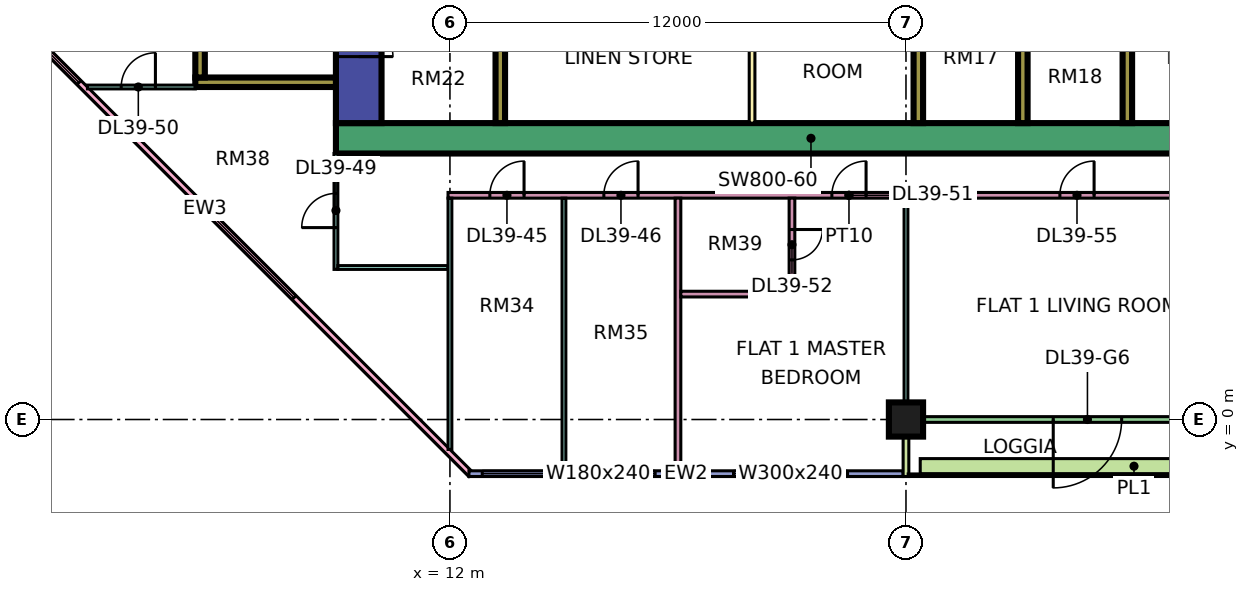
"""IFC4 building model, lengths in metres.
Left out: names, types, materials, properties, quantities, classifications, styles, units other than length and angle.
Written with IfcOpenShell. Run it as: python <this file> out.ifc"""

import sys

from ifc_helpers import new_model, si_unit, direction, frame, frame_2d, origin, origin_2d, place, context, subcontext, project, spatial, rectangle, extrude, element, fill, save


model = new_model("IFC4")
c1 = context("Model", 3, precision=1e-05, world=origin(), true_north=direction((0.0, 1.0)))
c2 = subcontext(c1, "Body", "Model", "MODEL_VIEW")
j1 = project(units=[si_unit("LENGTHUNIT", "METRE"), si_unit("PLANEANGLEUNIT", "RADIAN")], contexts=[c1])
p1 = place(None, origin())
s1 = spatial("IfcSite", under=j1, at=p1, CompositionType="ELEMENT")
p2 = place(p1, origin())
s2 = spatial("IfcBuilding", under=s1, at=p2, CompositionType="ELEMENT")
p3 = place(p2, frame((0.0, 0.0, 172.4)))
s3 = spatial("IfcBuildingStorey", under=s2, at=p3, CompositionType="ELEMENT", Elevation=172.4)
p4 = place(p3, frame((24.0, 0.0, 0.0), z_axis=(0.0, 0.0, 1.0), x_axis=(1.0, 0.0, 0.0)))
e1 = element("IfcColumn", 1, at=p4, inside=s3, PredefinedType="COLUMN", context=c2, shape_type="SweptSolid", body=[
    extrude(rectangle(XDim=0.9, YDim=0.9, at=origin_2d()), origin(), (0.0, 0.0, 1.0), 3.75),
])
p5 = place(p3, frame((9.0, 7.4, 0.0), z_axis=(0.0, 0.0, 1.0), x_axis=(1.0, 0.0, 0.0)))
e2 = element("IfcWall", 2, at=p5, inside=s3, PredefinedType="SHEAR", context=c2, shape_type="SweptSolid", body=[
    extrude(rectangle(XDim=25.0, YDim=0.8, at=frame_2d((12.5, 0.0))), origin(), (0.0, 0.0, 1.0), 3.75),
])
p6 = place(p3, frame((9.6, 7.8, 0.0), z_axis=(0.0, 0.0, 1.0), x_axis=(0.0, 1.0, 0.0)))
e3 = element("IfcWall", 3, at=p6, inside=s3, PredefinedType="SHEAR", context=c2, shape_type="SweptSolid", body=[
    extrude(rectangle(XDim=11.4, YDim=1.2, at=frame_2d((5.7, 0.0))), origin(), (0.0, 0.0, 1.0), 3.75),
])
p7 = place(p6, frame((4.075, 0.0, 0.0)))
e4 = element("IfcOpeningElement", 4, at=p7, cuts=e3, PredefinedType="OPENING", context=c2, shape_type="SweptSolid", body=[
    extrude(rectangle(XDim=1.1, YDim=2.2, at=frame_2d((0.55, 1.1))), frame((0.0, 0.61, 0.0), z_axis=(0.0, -1.0, 0.0), x_axis=(1.0, 0.0, 0.0)), (0.0, 0.0, 1.0), 1.22),
])
p8 = place(p6, frame((6.575, 0.0, 0.0)))
e5 = element("IfcOpeningElement", 5, at=p8, cuts=e3, PredefinedType="OPENING", context=c2, shape_type="SweptSolid", body=[
    extrude(rectangle(XDim=1.1, YDim=2.2, at=frame_2d((0.55, 1.1))), frame((0.0, 0.61, 0.0), z_axis=(0.0, -1.0, 0.0), x_axis=(1.0, 0.0, 0.0)), (0.0, 0.0, 1.0), 1.22),
])
p9 = place(p6, frame((9.4, 0.0, 0.0)))
e6 = element("IfcOpeningElement", 6, at=p9, cuts=e3, PredefinedType="OPENING", context=c2, shape_type="SweptSolid", body=[
    extrude(rectangle(XDim=1.1, YDim=2.2, at=frame_2d((0.55, 1.1))), frame((0.0, 0.61, 0.0), z_axis=(0.0, -1.0, 0.0), x_axis=(1.0, 0.0, 0.0)), (0.0, 0.0, 1.0), 1.22),
])
p10 = place(p6, frame((1.75, 0.0, 0.0)))
e7 = element("IfcOpeningElement", 7, at=p10, cuts=e3, PredefinedType="OPENING", context=c2, shape_type="SweptSolid", body=[
    extrude(rectangle(XDim=0.9, YDim=2.1, at=frame_2d((0.45, 1.05))), frame((0.0, 0.61, 0.0), z_axis=(0.0, -1.0, 0.0), x_axis=(1.0, 0.0, 0.0)), (0.0, 0.0, 1.0), 1.22),
])
p11 = place(p3, frame((13.325, 7.8, 0.0), z_axis=(0.0, 0.0, 1.0), x_axis=(0.0, 1.0, 0.0)))
e8 = element("IfcWall", 8, at=p11, inside=s3, PredefinedType="SHEAR", context=c2, shape_type="SweptSolid", body=[
    extrude(rectangle(XDim=11.4, YDim=0.25, at=frame_2d((5.7, 0.0))), origin(), (0.0, 0.0, 1.0), 3.75),
])
for number, where, z_axis, x_axis in (
    (9, (24.325, 7.8, 0.0), (0.0, 0.0, 1.0), (0.0, 1.0, 0.0)),
    (10, (27.075, 7.8, 0.0), (0.0, 0.0, 1.0), (0.0, 1.0, 0.0)),
    (11, (29.825, 7.8, 0.0), (0.0, 0.0, 1.0), (0.0, 1.0, 0.0)),
):
    element("IfcWall", number, at=place(p3, frame(where, z_axis=z_axis, x_axis=x_axis)), inside=s3, PredefinedType="SHEAR", context=c2, shape_type="SweptSolid", body=[
        extrude(rectangle(XDim=3.4, YDim=0.25, at=frame_2d((1.7, 0.0))), origin(), (0.0, 0.0, 1.0), 3.75),
    ])
p12 = place(p3, frame((5.3, 8.875, 0.0), z_axis=(0.0, 0.0, 1.0), x_axis=(1.0, 0.0, 0.0)))
e12 = element("IfcWall", 12, at=p12, inside=s3, PredefinedType="SHEAR", context=c2, shape_type="SweptSolid", body=[
    extrude(rectangle(XDim=3.7, YDim=0.25, at=frame_2d((1.85, 0.0))), origin(), (0.0, 0.0, 1.0), 3.75),
])
p13 = place(p3, frame((5.425, 9.0, 0.0), z_axis=(0.0, 0.0, 1.0), x_axis=(0.0, 1.0, 0.0)))
e13 = element("IfcWall", 13, at=p13, inside=s3, PredefinedType="SHEAR", context=c2, shape_type="SweptSolid", body=[
    extrude(rectangle(XDim=4.0, YDim=0.25, at=frame_2d((2.0, 0.0))), origin(), (0.0, 0.0, 1.0), 3.75),
])
p14 = place(p3, frame((-1.447, 12.553, 0.0), z_axis=(0.0, 0.0, 1.0), x_axis=(0.707106781187, -0.707106781187, 0.0)))
e14 = element("IfcWall", 14, at=p14, inside=s3, PredefinedType="SOLIDWALL", context=c2, shape_type="SweptSolid", body=[
    extrude(rectangle(XDim=19.799, YDim=0.15, at=frame_2d((9.899, 0.0))), origin(), (0.0, 0.0, 1.0), 3.35),
])
p15 = place(p14, frame((2.212, 0.0, 0.45)))
e15 = element("IfcOpeningElement", 15, at=p15, cuts=e14, PredefinedType="OPENING", context=c2, shape_type="SweptSolid", body=[
    extrude(rectangle(XDim=3.0, YDim=2.4, at=frame_2d((1.5, 1.2))), frame((0.0, 0.085, 0.0), z_axis=(0.0, -1.0, 0.0), x_axis=(1.0, 0.0, 0.0)), (0.0, 0.0, 1.0), 0.17),
])
p16 = place(p14, frame((10.216, 0.0, 0.45)))
e16 = element("IfcOpeningElement", 16, at=p16, cuts=e14, PredefinedType="OPENING", context=c2, shape_type="SweptSolid", body=[
    extrude(rectangle(XDim=3.0, YDim=2.4, at=frame_2d((1.5, 1.2))), frame((0.0, 0.085, 0.0), z_axis=(0.0, -1.0, 0.0), x_axis=(1.0, 0.0, 0.0)), (0.0, 0.0, 1.0), 0.17),
])
p17 = place(p3, frame((12.5, -1.425, 0.0), z_axis=(0.0, 0.0, 1.0), x_axis=(1.0, 0.0, 0.0)))
e17 = element("IfcWall", 17, at=p17, inside=s3, PredefinedType="SOLIDWALL", context=c2, shape_type="SweptSolid", body=[
    extrude(rectangle(XDim=11.425, YDim=0.15, at=frame_2d((5.712, 0.0))), origin(), (0.0, 0.0, 1.0), 3.35),
])
p18 = place(p17, frame((0.35, 0.0, 0.45)))
e18 = element("IfcOpeningElement", 18, at=p18, cuts=e17, PredefinedType="OPENING", context=c2, shape_type="SweptSolid", body=[
    extrude(rectangle(XDim=1.8, YDim=2.4, at=frame_2d((0.9, 1.2))), frame((0.0, 0.085, 0.0), z_axis=(0.0, -1.0, 0.0), x_axis=(1.0, 0.0, 0.0)), (0.0, 0.0, 1.0), 0.17),
])
p19 = place(p17, frame((3.1, 0.0, 0.45)))
e19 = element("IfcOpeningElement", 19, at=p19, cuts=e17, PredefinedType="OPENING", context=c2, shape_type="SweptSolid", body=[
    extrude(rectangle(XDim=1.8, YDim=2.4, at=frame_2d((0.9, 1.2))), frame((0.0, 0.085, 0.0), z_axis=(0.0, -1.0, 0.0), x_axis=(1.0, 0.0, 0.0)), (0.0, 0.0, 1.0), 0.17),
])
p20 = place(p17, frame((6.962, 0.0, 0.45)))
e20 = element("IfcOpeningElement", 20, at=p20, cuts=e17, PredefinedType="OPENING", context=c2, shape_type="SweptSolid", body=[
    extrude(rectangle(XDim=3.0, YDim=2.4, at=frame_2d((1.5, 1.2))), frame((0.0, 0.085, 0.0), z_axis=(0.0, -1.0, 0.0), x_axis=(1.0, 0.0, 0.0)), (0.0, 0.0, 1.0), 0.17),
])
p21 = place(p3, frame((24.075, 0.0, 0.0), z_axis=(0.0, 0.0, 1.0), x_axis=(1.0, 0.0, 0.0)))
e21 = element("IfcWall", 21, at=p21, inside=s3, PredefinedType="SOLIDWALL", context=c2, shape_type="SweptSolid", body=[
    extrude(rectangle(XDim=11.85, YDim=0.15, at=frame_2d((5.925, 0.0))), origin(), (0.0, 0.0, 1.0), 3.35),
])
p22 = place(p21, frame((3.8, 0.0, 0.0)))
e22 = element("IfcOpeningElement", 22, at=p22, cuts=e21, PredefinedType="OPENING", context=c2, shape_type="SweptSolid", body=[
    extrude(rectangle(XDim=1.8, YDim=2.4, at=frame_2d((0.9, 1.2))), frame((0.0, 0.085, 0.0), z_axis=(0.0, -1.0, 0.0), x_axis=(1.0, 0.0, 0.0)), (0.0, 0.0, 1.0), 0.17),
])
p23 = place(p21, frame((9.55, 0.0, 0.45)))
e23 = element("IfcOpeningElement", 23, at=p23, cuts=e21, PredefinedType="OPENING", context=c2, shape_type="SweptSolid", body=[
    extrude(rectangle(XDim=1.2, YDim=2.4, at=frame_2d((0.6, 1.2))), frame((0.0, 0.085, 0.0), z_axis=(0.0, -1.0, 0.0), x_axis=(1.0, 0.0, 0.0)), (0.0, 0.0, 1.0), 0.17),
])
p24 = place(p3, frame((24.0, -1.5, 0.0), z_axis=(0.0, 0.0, 1.0), x_axis=(0.0, 1.0, 0.0)))
e24 = element("IfcWall", 24, at=p24, inside=s3, PredefinedType="SOLIDWALL", context=c2, shape_type="SweptSolid", body=[
    extrude(rectangle(XDim=1.5, YDim=0.15, at=frame_2d((0.75, 0.0))), origin(), (0.0, 0.0, 1.0), 3.35),
])
p25 = place(p3, frame((24.375, -1.229, 0.0), z_axis=(0.0, 0.0, 1.0), x_axis=(1.0, 0.0, 0.0)))
e25 = element("IfcWall", 25, at=p25, inside=s3, PredefinedType="SOLIDWALL", context=c2, shape_type="SweptSolid", body=[
    extrude(rectangle(XDim=11.25, YDim=0.4, at=frame_2d((5.625, 0.0))), origin(), (0.0, 0.0, 1.0), 0.7),
])
p26 = place(p3, frame((19.95, 7.8, 0.0), z_axis=(0.0, 0.0, 1.0), x_axis=(0.0, 1.0, 0.0)))
e26 = element("IfcWall", 26, at=p26, inside=s3, PredefinedType="PARTITIONING", context=c2, shape_type="SweptSolid", body=[
    extrude(rectangle(XDim=3.4, YDim=0.15, at=frame_2d((1.7, 0.0))), origin(), (0.0, 0.0, 1.0), 3.35),
])
p27 = place(p3, frame((2.461, 8.75, 0.0), z_axis=(0.0, 0.0, 1.0), x_axis=(1.0, 0.0, 0.0)))
e27 = element("IfcWall", 27, at=p27, inside=s3, PredefinedType="PARTITIONING", context=c2, shape_type="SweptSolid", body=[
    extrude(rectangle(XDim=2.839, YDim=0.1, at=frame_2d((1.419, 0.0))), origin(), (0.0, 0.0, 1.0), 3.35),
])
p28 = place(p27, frame((0.889, 0.0, 0.0)))
e28 = element("IfcOpeningElement", 28, at=p28, cuts=e27, PredefinedType="OPENING", context=c2, shape_type="SweptSolid", body=[
    extrude(rectangle(XDim=0.9, YDim=2.1, at=frame_2d((0.45, 1.05))), frame((0.0, 0.06, 0.0), z_axis=(0.0, -1.0, 0.0), x_axis=(1.0, 0.0, 0.0)), (0.0, 0.0, 1.0), 0.12),
])
p29 = place(p3, frame((9.0, 3.95, 0.0), z_axis=(0.0, 0.0, 1.0), x_axis=(0.0, 1.0, 0.0)))
e29 = element("IfcWall", 29, at=p29, inside=s3, PredefinedType="PARTITIONING", context=c2, shape_type="SweptSolid", body=[
    extrude(rectangle(XDim=3.05, YDim=0.1, at=frame_2d((1.525, 0.0))), origin(), (0.0, 0.0, 1.0), 3.35),
])
p30 = place(p29, frame((1.1, 0.0, 0.0)))
e30 = element("IfcOpeningElement", 30, at=p30, cuts=e29, PredefinedType="OPENING", context=c2, shape_type="SweptSolid", body=[
    extrude(rectangle(XDim=0.9, YDim=2.1, at=frame_2d((0.45, 1.05))), frame((0.0, 0.06, 0.0), z_axis=(0.0, -1.0, 0.0), x_axis=(1.0, 0.0, 0.0)), (0.0, 0.0, 1.0), 0.12),
])
p31 = place(p3, frame((9.05, 4.0, 0.0), z_axis=(0.0, 0.0, 1.0), x_axis=(1.0, 0.0, 0.0)))
e31 = element("IfcWall", 31, at=p31, inside=s3, PredefinedType="PARTITIONING", context=c2, shape_type="SweptSolid", body=[
    extrude(rectangle(XDim=2.9, YDim=0.1, at=frame_2d((1.45, 0.0))), origin(), (0.0, 0.0, 1.0), 3.35),
])
p32 = place(p3, frame((11.95, 5.9, 0.0), z_axis=(0.0, 0.0, 1.0), x_axis=(1.0, 0.0, 0.0)))
e32 = element("IfcWall", 32, at=p32, inside=s3, PredefinedType="PARTITIONING", context=c2, shape_type="SweptSolid", body=[
    extrude(rectangle(XDim=21.1, YDim=0.15, at=frame_2d((10.55, 0.0))), origin(), (0.0, 0.0, 1.0), 3.35),
])
p33 = place(p32, frame((1.1, 0.0, 0.0)))
e33 = element("IfcOpeningElement", 33, at=p33, cuts=e32, PredefinedType="OPENING", context=c2, shape_type="SweptSolid", body=[
    extrude(rectangle(XDim=0.9, YDim=2.1, at=frame_2d((0.45, 1.05))), frame((0.0, 0.085, 0.0), z_axis=(0.0, -1.0, 0.0), x_axis=(1.0, 0.0, 0.0)), (0.0, 0.0, 1.0), 0.17),
])
p34 = place(p32, frame((4.1, 0.0, 0.0)))
e34 = element("IfcOpeningElement", 34, at=p34, cuts=e32, PredefinedType="OPENING", context=c2, shape_type="SweptSolid", body=[
    extrude(rectangle(XDim=0.9, YDim=2.1, at=frame_2d((0.45, 1.05))), frame((0.0, 0.085, 0.0), z_axis=(0.0, -1.0, 0.0), x_axis=(1.0, 0.0, 0.0)), (0.0, 0.0, 1.0), 0.17),
])
p35 = place(p32, frame((10.1, 0.0, 0.0)))
e35 = element("IfcOpeningElement", 35, at=p35, cuts=e32, PredefinedType="OPENING", context=c2, shape_type="SweptSolid", body=[
    extrude(rectangle(XDim=0.9, YDim=2.1, at=frame_2d((0.45, 1.05))), frame((0.0, 0.085, 0.0), z_axis=(0.0, -1.0, 0.0), x_axis=(1.0, 0.0, 0.0)), (0.0, 0.0, 1.0), 0.17),
])
p36 = place(p32, frame((16.1, 0.0, 0.0)))
e36 = element("IfcOpeningElement", 36, at=p36, cuts=e32, PredefinedType="OPENING", context=c2, shape_type="SweptSolid", body=[
    extrude(rectangle(XDim=0.9, YDim=2.1, at=frame_2d((0.45, 1.05))), frame((0.0, 0.085, 0.0), z_axis=(0.0, -1.0, 0.0), x_axis=(1.0, 0.0, 0.0)), (0.0, 0.0, 1.0), 0.17),
])
p37 = place(p3, frame((12.0, -0.788, 0.0), z_axis=(0.0, 0.0, 1.0), x_axis=(0.0, 1.0, 0.0)))
e37 = element("IfcWall", 37, at=p37, inside=s3, PredefinedType="PARTITIONING", context=c2, shape_type="SweptSolid", body=[
    extrude(rectangle(XDim=6.613, YDim=0.1, at=frame_2d((3.306, 0.0))), origin(), (0.0, 0.0, 1.0), 3.35),
])
p38 = place(p3, frame((15.0, -1.351, 0.0), z_axis=(0.0, 0.0, 1.0), x_axis=(0.0, 1.0, 0.0)))
e38 = element("IfcWall", 38, at=p38, inside=s3, PredefinedType="PARTITIONING", context=c2, shape_type="SweptSolid", body=[
    extrude(rectangle(XDim=7.176, YDim=0.1, at=frame_2d((3.588, 0.0))), origin(), (0.0, 0.0, 1.0), 3.35),
])
p39 = place(p3, frame((18.0, -1.351, 0.0), z_axis=(0.0, 0.0, 1.0), x_axis=(0.0, 1.0, 0.0)))
e39 = element("IfcWall", 39, at=p39, inside=s3, PredefinedType="PARTITIONING", context=c2, shape_type="SweptSolid", body=[
    extrude(rectangle(XDim=7.176, YDim=0.15, at=frame_2d((3.588, 0.0))), origin(), (0.0, 0.0, 1.0), 3.35),
])
p40 = place(p3, frame((18.075, 3.3, 0.0), z_axis=(0.0, 0.0, 1.0), x_axis=(1.0, 0.0, 0.0)))
e40 = element("IfcWall", 40, at=p40, inside=s3, PredefinedType="PARTITIONING", context=c2, shape_type="SweptSolid", body=[
    extrude(rectangle(XDim=3.0, YDim=0.15, at=frame_2d((1.5, 0.0))), origin(), (0.0, 0.0, 1.0), 3.35),
])
p41 = place(p3, frame((21.0, 3.375, 0.0), z_axis=(0.0, 0.0, 1.0), x_axis=(0.0, 1.0, 0.0)))
e41 = element("IfcWall", 41, at=p41, inside=s3, PredefinedType="PARTITIONING", context=c2, shape_type="SweptSolid", body=[
    extrude(rectangle(XDim=2.45, YDim=0.15, at=frame_2d((1.225, 0.0))), origin(), (0.0, 0.0, 1.0), 3.35),
])
p42 = place(p41, frame((0.825, 0.0, 0.0)))
e42 = element("IfcOpeningElement", 42, at=p42, cuts=e41, PredefinedType="OPENING", context=c2, shape_type="SweptSolid", body=[
    extrude(rectangle(XDim=0.8, YDim=2.1, at=frame_2d((0.4, 1.05))), frame((0.0, 0.085, 0.0), z_axis=(0.0, -1.0, 0.0), x_axis=(1.0, 0.0, 0.0)), (0.0, 0.0, 1.0), 0.17),
])
p43 = place(p3, frame((24.0, 0.0, 0.0), z_axis=(0.0, 0.0, 1.0), x_axis=(0.0, 1.0, 0.0)))
e43 = element("IfcWall", 43, at=p43, inside=s3, PredefinedType="PARTITIONING", context=c2, shape_type="SweptSolid", body=[
    extrude(rectangle(XDim=5.825, YDim=0.1, at=frame_2d((2.913, 0.0))), origin(), (0.0, 0.0, 1.0), 3.35),
])
p44 = place(p15, origin())
e44 = element("IfcWindow", 44, at=p44, inside=s3, PartitioningType="SINGLE_PANEL", PredefinedType="WINDOW", context=c2, shape_type="SweptSolid", body=[
    extrude(rectangle(XDim=3.0, YDim=2.4, at=frame_2d((1.5, 1.2))), frame((0.0, 0.03, 0.0), z_axis=(0.0, -1.0, 0.0), x_axis=(1.0, 0.0, 0.0)), (0.0, 0.0, 1.0), 0.06),
])
fill(e15, e44)
p45 = place(p16, origin())
e45 = element("IfcWindow", 45, at=p45, inside=s3, PartitioningType="SINGLE_PANEL", PredefinedType="WINDOW", context=c2, shape_type="SweptSolid", body=[
    extrude(rectangle(XDim=3.0, YDim=2.4, at=frame_2d((1.5, 1.2))), frame((0.0, 0.03, 0.0), z_axis=(0.0, -1.0, 0.0), x_axis=(1.0, 0.0, 0.0)), (0.0, 0.0, 1.0), 0.06),
])
fill(e16, e45)
p46 = place(p18, origin())
e46 = element("IfcWindow", 46, at=p46, inside=s3, PartitioningType="SINGLE_PANEL", PredefinedType="WINDOW", context=c2, shape_type="SweptSolid", body=[
    extrude(rectangle(XDim=1.8, YDim=2.4, at=frame_2d((0.9, 1.2))), frame((0.0, 0.03, 0.0), z_axis=(0.0, -1.0, 0.0), x_axis=(1.0, 0.0, 0.0)), (0.0, 0.0, 1.0), 0.06),
])
fill(e18, e46)
p47 = place(p19, origin())
e47 = element("IfcWindow", 47, at=p47, inside=s3, PartitioningType="SINGLE_PANEL", PredefinedType="WINDOW", context=c2, shape_type="SweptSolid", body=[
    extrude(rectangle(XDim=1.8, YDim=2.4, at=frame_2d((0.9, 1.2))), frame((0.0, 0.03, 0.0), z_axis=(0.0, -1.0, 0.0), x_axis=(1.0, 0.0, 0.0)), (0.0, 0.0, 1.0), 0.06),
])
fill(e19, e47)
p48 = place(p20, origin())
e48 = element("IfcWindow", 48, at=p48, inside=s3, PartitioningType="SINGLE_PANEL", PredefinedType="WINDOW", context=c2, shape_type="SweptSolid", body=[
    extrude(rectangle(XDim=3.0, YDim=2.4, at=frame_2d((1.5, 1.2))), frame((0.0, 0.03, 0.0), z_axis=(0.0, -1.0, 0.0), x_axis=(1.0, 0.0, 0.0)), (0.0, 0.0, 1.0), 0.06),
])
fill(e20, e48)
p49 = place(p22, frame((1.8, 0.0, 0.0), z_axis=(0.0, 0.0, 1.0), x_axis=(-1.0, 0.0, 0.0)))
e49 = element("IfcDoor", 49, at=p49, inside=s3, OperationType="DOUBLE_DOOR_SINGLE_SWING", PredefinedType="DOOR", context=c2, shape_type="SweptSolid", body=[
    extrude(rectangle(XDim=1.8, YDim=2.4, at=frame_2d((0.9, 1.2))), frame((0.0, 0.025, 0.0), z_axis=(0.0, -1.0, 0.0), x_axis=(1.0, 0.0, 0.0)), (0.0, 0.0, 1.0), 0.05),
])
fill(e22, e49)
p50 = place(p10, frame((0.9, 0.0, 0.0), z_axis=(0.0, 0.0, 1.0), x_axis=(-1.0, 0.0, 0.0)))
e50 = element("IfcDoor", 50, at=p50, inside=s3, OperationType="SINGLE_SWING_LEFT", PredefinedType="DOOR", context=c2, shape_type="SweptSolid", body=[
    extrude(rectangle(XDim=0.9, YDim=2.1, at=frame_2d((0.45, 1.05))), frame((0.0, 0.025, 0.0), z_axis=(0.0, -1.0, 0.0), x_axis=(1.0, 0.0, 0.0)), (0.0, 0.0, 1.0), 0.05),
])
fill(e7, e50)
p51 = place(p33, frame((0.9, 0.0, 0.0), z_axis=(0.0, 0.0, 1.0), x_axis=(-1.0, 0.0, 0.0)))
e51 = element("IfcDoor", 51, at=p51, inside=s3, OperationType="SINGLE_SWING_RIGHT", PredefinedType="DOOR", context=c2, shape_type="SweptSolid", body=[
    extrude(rectangle(XDim=0.9, YDim=2.1, at=frame_2d((0.45, 1.05))), frame((0.0, 0.025, 0.0), z_axis=(0.0, -1.0, 0.0), x_axis=(1.0, 0.0, 0.0)), (0.0, 0.0, 1.0), 0.05),
])
fill(e33, e51)
p52 = place(p34, frame((0.9, 0.0, 0.0), z_axis=(0.0, 0.0, 1.0), x_axis=(-1.0, 0.0, 0.0)))
e52 = element("IfcDoor", 52, at=p52, inside=s3, OperationType="SINGLE_SWING_RIGHT", PredefinedType="DOOR", context=c2, shape_type="SweptSolid", body=[
    extrude(rectangle(XDim=0.9, YDim=2.1, at=frame_2d((0.45, 1.05))), frame((0.0, 0.025, 0.0), z_axis=(0.0, -1.0, 0.0), x_axis=(1.0, 0.0, 0.0)), (0.0, 0.0, 1.0), 0.05),
])
fill(e34, e52)
p53 = place(p30, origin())
e53 = element("IfcDoor", 53, at=p53, inside=s3, OperationType="SINGLE_SWING_LEFT", PredefinedType="DOOR", context=c2, shape_type="SweptSolid", body=[
    extrude(rectangle(XDim=0.9, YDim=2.1, at=frame_2d((0.45, 1.05))), frame((0.0, 0.025, 0.0), z_axis=(0.0, -1.0, 0.0), x_axis=(1.0, 0.0, 0.0)), (0.0, 0.0, 1.0), 0.05),
])
fill(e30, e53)
p54 = place(p28, frame((0.9, 0.0, 0.0), z_axis=(0.0, 0.0, 1.0), x_axis=(-1.0, 0.0, 0.0)))
e54 = element("IfcDoor", 54, at=p54, inside=s3, OperationType="SINGLE_SWING_RIGHT", PredefinedType="DOOR", context=c2, shape_type="SweptSolid", body=[
    extrude(rectangle(XDim=0.9, YDim=2.1, at=frame_2d((0.45, 1.05))), frame((0.0, 0.025, 0.0), z_axis=(0.0, -1.0, 0.0), x_axis=(1.0, 0.0, 0.0)), (0.0, 0.0, 1.0), 0.05),
])
fill(e28, e54)
p55 = place(p35, frame((0.9, 0.0, 0.0), z_axis=(0.0, 0.0, 1.0), x_axis=(-1.0, 0.0, 0.0)))
e55 = element("IfcDoor", 55, at=p55, inside=s3, OperationType="SINGLE_SWING_RIGHT", PredefinedType="DOOR", context=c2, shape_type="SweptSolid", body=[
    extrude(rectangle(XDim=0.9, YDim=2.1, at=frame_2d((0.45, 1.05))), frame((0.0, 0.025, 0.0), z_axis=(0.0, -1.0, 0.0), x_axis=(1.0, 0.0, 0.0)), (0.0, 0.0, 1.0), 0.05),
])
fill(e35, e55)
p56 = place(p42, origin())
e56 = element("IfcDoor", 56, at=p56, inside=s3, OperationType="SINGLE_SWING_RIGHT", PredefinedType="DOOR", context=c2, shape_type="SweptSolid", body=[
    extrude(rectangle(XDim=0.8, YDim=2.1, at=frame_2d((0.4, 1.05))), frame((0.0, 0.025, 0.0), z_axis=(0.0, -1.0, 0.0), x_axis=(1.0, 0.0, 0.0)), (0.0, 0.0, 1.0), 0.05),
])
fill(e42, e56)
p57 = place(p36, frame((0.9, 0.0, 0.0), z_axis=(0.0, 0.0, 1.0), x_axis=(-1.0, 0.0, 0.0)))
e57 = element("IfcDoor", 57, at=p57, inside=s3, OperationType="SINGLE_SWING_RIGHT", PredefinedType="DOOR", context=c2, shape_type="SweptSolid", body=[
    extrude(rectangle(XDim=0.9, YDim=2.1, at=frame_2d((0.45, 1.05))), frame((0.0, 0.025, 0.0), z_axis=(0.0, -1.0, 0.0), x_axis=(1.0, 0.0, 0.0)), (0.0, 0.0, 1.0), 0.05),
])
fill(e36, e57)
save(model, sys.argv[1])
